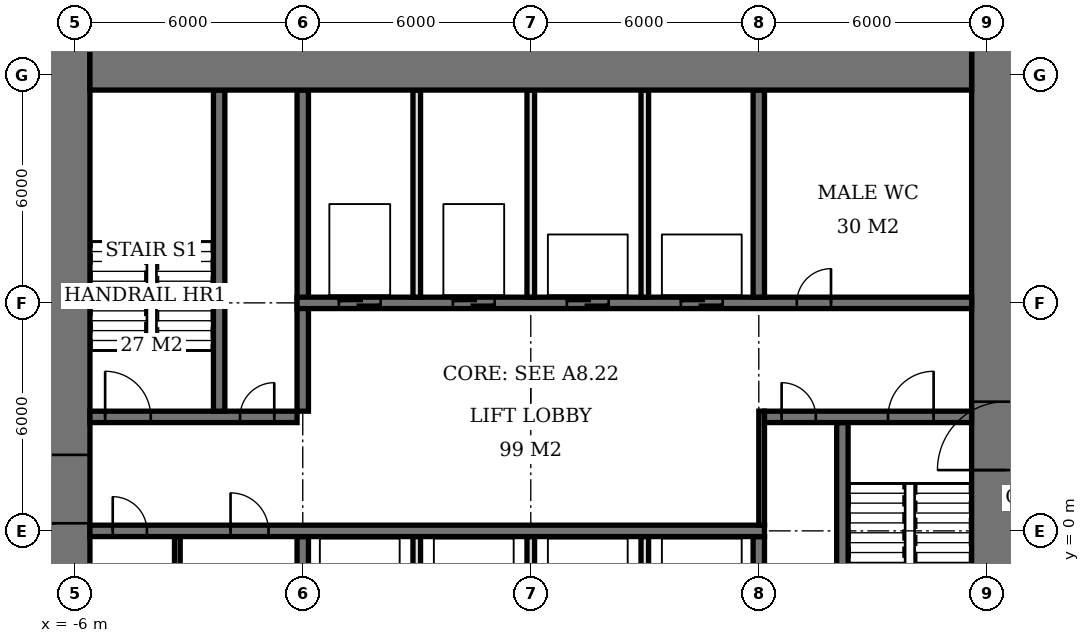
"""IFC4 building model, lengths in metres.
Left out: names, types, materials, properties, quantities, classifications, styles, units other than length and angle.
Written with IfcOpenShell. Run it as: python <this file> out.ifc"""

import sys

from ifc_helpers import new_model, si_unit, direction, frame, frame_2d, origin, place, context, subcontext, project, spatial, rectangle, extrude, element, fill, save


model = new_model("IFC4")
c1 = context("Model", 3, precision=1e-05, world=origin(), true_north=direction((0.0, 1.0)))
c2 = subcontext(c1, "Body", "Model", "MODEL_VIEW")
j1 = project(units=[si_unit("LENGTHUNIT", "METRE"), si_unit("PLANEANGLEUNIT", "RADIAN")], contexts=[c1])
p1 = place(None, origin())
s1 = spatial("IfcSite", under=j1, at=p1, CompositionType="ELEMENT")
p2 = place(p1, origin())
s2 = spatial("IfcBuilding", under=s1, at=p2, CompositionType="ELEMENT")
p3 = place(p2, frame((0.0, 0.0, 29.9)))
s3 = spatial("IfcBuildingStorey", under=s2, at=p3, CompositionType="ELEMENT", Elevation=29.9)
p4 = place(p3, frame((-5.6, 12.6, 0.0), z_axis=(0.0, 0.0, 1.0), x_axis=(1.0, 0.0, 0.0)))
e1 = element("IfcWall", 1, at=p4, inside=s3, PredefinedType="SHEAR", context=c2, shape_type="SweptSolid", body=[
    extrude(rectangle(XDim=23.2, YDim=2.0, at=frame_2d((11.6, 0.0))), origin(), (0.0, 0.0, 1.0), 3.9),
])
p5 = place(p3, frame((-6.5, -7.6, 0.0), z_axis=(0.0, 0.0, 1.0), x_axis=(0.0, 1.0, 0.0)))
e2 = element("IfcWall", 2, at=p5, inside=s3, PredefinedType="SHEAR", context=c2, shape_type="SweptSolid", body=[
    extrude(rectangle(XDim=21.2, YDim=1.8, at=frame_2d((10.6, 0.0))), origin(), (0.0, 0.0, 1.0), 3.9),
])
p6 = place(p5, frame((7.8, 0.0, 0.0)))
e3 = element("IfcOpeningElement", 3, at=p6, cuts=e2, PredefinedType="OPENING", context=c2, shape_type="SweptSolid", body=[
    extrude(rectangle(XDim=1.8, YDim=2.4, at=frame_2d((0.9, 1.2))), frame((0.0, 0.91, 0.0), z_axis=(0.0, -1.0, 0.0), x_axis=(1.0, 0.0, 0.0)), (0.0, 0.0, 1.0), 1.82),
])
p7 = place(p3, frame((18.5, -7.6, 0.0), z_axis=(0.0, 0.0, 1.0), x_axis=(0.0, 1.0, 0.0)))
e4 = element("IfcWall", 4, at=p7, inside=s3, PredefinedType="SHEAR", context=c2, shape_type="SweptSolid", body=[
    extrude(rectangle(XDim=21.2, YDim=1.8, at=frame_2d((10.6, 0.0))), origin(), (0.0, 0.0, 1.0), 3.9),
])
p8 = place(p7, frame((9.2, 0.0, 0.0)))
e5 = element("IfcOpeningElement", 5, at=p8, cuts=e4, PredefinedType="OPENING", context=c2, shape_type="SweptSolid", body=[
    extrude(rectangle(XDim=1.8, YDim=2.4, at=frame_2d((0.9, 1.2))), frame((0.0, 0.91, 0.0), z_axis=(0.0, -1.0, 0.0), x_axis=(1.0, 0.0, 0.0)), (0.0, 0.0, 1.0), 1.82),
])
p9 = place(p3, frame((-5.6, 0.0, 0.0), z_axis=(0.0, 0.0, 1.0), x_axis=(1.0, 0.0, 0.0)))
e6 = element("IfcWall", 6, at=p9, inside=s3, PredefinedType="SHEAR", context=c2, shape_type="SweptSolid", body=[
    extrude(rectangle(XDim=17.75, YDim=0.3, at=frame_2d((8.875, 0.0))), origin(), (0.0, 0.0, 1.0), 3.9),
])
p10 = place(p9, frame((0.6, 0.0, 0.0)))
e7 = element("IfcOpeningElement", 7, at=p10, cuts=e6, PredefinedType="OPENING", context=c2, shape_type="SweptSolid", body=[
    extrude(rectangle(XDim=0.9, YDim=2.1, at=frame_2d((0.45, 1.05))), frame((0.0, 0.16, 0.0), z_axis=(0.0, -1.0, 0.0), x_axis=(1.0, 0.0, 0.0)), (0.0, 0.0, 1.0), 0.32),
])
p11 = place(p9, frame((3.7, 0.0, 0.0)))
e8 = element("IfcOpeningElement", 8, at=p11, cuts=e6, PredefinedType="OPENING", context=c2, shape_type="SweptSolid", body=[
    extrude(rectangle(XDim=1.0, YDim=2.1, at=frame_2d((0.5, 1.05))), frame((0.0, 0.16, 0.0), z_axis=(0.0, -1.0, 0.0), x_axis=(1.0, 0.0, 0.0)), (0.0, 0.0, 1.0), 0.32),
])
p12 = place(p3, frame((-5.6, 3.0, 0.0), z_axis=(0.0, 0.0, 1.0), x_axis=(1.0, 0.0, 0.0)))
e9 = element("IfcWall", 9, at=p12, inside=s3, PredefinedType="SHEAR", context=c2, shape_type="SweptSolid", body=[
    extrude(rectangle(XDim=5.45, YDim=0.3, at=frame_2d((2.725, 0.0))), origin(), (0.0, 0.0, 1.0), 3.9),
])
p13 = place(p12, frame((0.4, 0.0, 0.0)))
e10 = element("IfcOpeningElement", 10, at=p13, cuts=e9, PredefinedType="OPENING", context=c2, shape_type="SweptSolid", body=[
    extrude(rectangle(XDim=1.2, YDim=2.1, at=frame_2d((0.6, 1.05))), frame((0.0, 0.16, 0.0), z_axis=(0.0, -1.0, 0.0), x_axis=(1.0, 0.0, 0.0)), (0.0, 0.0, 1.0), 0.32),
])
p14 = place(p12, frame((3.95, 0.0, 0.0)))
e11 = element("IfcOpeningElement", 11, at=p14, cuts=e9, PredefinedType="OPENING", context=c2, shape_type="SweptSolid", body=[
    extrude(rectangle(XDim=0.9, YDim=2.1, at=frame_2d((0.45, 1.05))), frame((0.0, 0.16, 0.0), z_axis=(0.0, -1.0, 0.0), x_axis=(1.0, 0.0, 0.0)), (0.0, 0.0, 1.0), 0.32),
])
p15 = place(p3, frame((12.15, 3.0, 0.0), z_axis=(0.0, 0.0, 1.0), x_axis=(1.0, 0.0, 0.0)))
e12 = element("IfcWall", 12, at=p15, inside=s3, PredefinedType="SHEAR", context=c2, shape_type="SweptSolid", body=[
    extrude(rectangle(XDim=5.45, YDim=0.3, at=frame_2d((2.725, 0.0))), origin(), (0.0, 0.0, 1.0), 3.9),
])
p16 = place(p15, frame((3.25, 0.0, 0.0)))
e13 = element("IfcOpeningElement", 13, at=p16, cuts=e12, PredefinedType="OPENING", context=c2, shape_type="SweptSolid", body=[
    extrude(rectangle(XDim=1.2, YDim=2.1, at=frame_2d((0.6, 1.05))), frame((0.0, 0.16, 0.0), z_axis=(0.0, -1.0, 0.0), x_axis=(1.0, 0.0, 0.0)), (0.0, 0.0, 1.0), 0.32),
])
p17 = place(p15, frame((0.45, 0.0, 0.0)))
e14 = element("IfcOpeningElement", 14, at=p17, cuts=e12, PredefinedType="OPENING", context=c2, shape_type="SweptSolid", body=[
    extrude(rectangle(XDim=0.9, YDim=2.1, at=frame_2d((0.45, 1.05))), frame((0.0, 0.16, 0.0), z_axis=(0.0, -1.0, 0.0), x_axis=(1.0, 0.0, 0.0)), (0.0, 0.0, 1.0), 0.32),
])
p18 = place(p3, frame((-0.15, 6.0, 0.0), z_axis=(0.0, 0.0, 1.0), x_axis=(1.0, 0.0, 0.0)))
e15 = element("IfcWall", 15, at=p18, inside=s3, PredefinedType="SHEAR", context=c2, shape_type="SweptSolid", body=[
    extrude(rectangle(XDim=17.75, YDim=0.3, at=frame_2d((8.875, 0.0))), origin(), (0.0, 0.0, 1.0), 3.9),
])
p19 = place(p18, frame((13.15, 0.0, 0.0)))
e16 = element("IfcOpeningElement", 16, at=p19, cuts=e15, PredefinedType="OPENING", context=c2, shape_type="SweptSolid", body=[
    extrude(rectangle(XDim=0.9, YDim=2.1, at=frame_2d((0.45, 1.05))), frame((0.0, 0.16, 0.0), z_axis=(0.0, -1.0, 0.0), x_axis=(1.0, 0.0, 0.0)), (0.0, 0.0, 1.0), 0.32),
])
p20 = place(p18, frame((1.1, 0.0, 0.0)))
e17 = element("IfcOpeningElement", 17, at=p20, cuts=e15, PredefinedType="OPENING", context=c2, shape_type="SweptSolid", body=[
    extrude(rectangle(XDim=1.1, YDim=2.1, at=frame_2d((0.55, 1.05))), frame((0.0, 0.16, 0.0), z_axis=(0.0, -1.0, 0.0), x_axis=(1.0, 0.0, 0.0)), (0.0, 0.0, 1.0), 0.32),
])
p21 = place(p18, frame((4.1, 0.0, 0.0)))
e18 = element("IfcOpeningElement", 18, at=p21, cuts=e15, PredefinedType="OPENING", context=c2, shape_type="SweptSolid", body=[
    extrude(rectangle(XDim=1.1, YDim=2.1, at=frame_2d((0.55, 1.05))), frame((0.0, 0.16, 0.0), z_axis=(0.0, -1.0, 0.0), x_axis=(1.0, 0.0, 0.0)), (0.0, 0.0, 1.0), 0.32),
])
p22 = place(p18, frame((7.1, 0.0, 0.0)))
e19 = element("IfcOpeningElement", 19, at=p22, cuts=e15, PredefinedType="OPENING", context=c2, shape_type="SweptSolid", body=[
    extrude(rectangle(XDim=1.1, YDim=2.1, at=frame_2d((0.55, 1.05))), frame((0.0, 0.16, 0.0), z_axis=(0.0, -1.0, 0.0), x_axis=(1.0, 0.0, 0.0)), (0.0, 0.0, 1.0), 0.32),
])
p23 = place(p18, frame((10.1, 0.0, 0.0)))
e20 = element("IfcOpeningElement", 20, at=p23, cuts=e15, PredefinedType="OPENING", context=c2, shape_type="SweptSolid", body=[
    extrude(rectangle(XDim=1.1, YDim=2.1, at=frame_2d((0.55, 1.05))), frame((0.0, 0.16, 0.0), z_axis=(0.0, -1.0, 0.0), x_axis=(1.0, 0.0, 0.0)), (0.0, 0.0, 1.0), 0.32),
])
p24 = place(p3, frame((0.0, -5.6, 0.0), z_axis=(0.0, 0.0, 1.0), x_axis=(0.0, 1.0, 0.0)))
e21 = element("IfcWall", 21, at=p24, inside=s3, PredefinedType="SHEAR", context=c2, shape_type="SweptSolid", body=[
    extrude(rectangle(XDim=5.45, YDim=0.3, at=frame_2d((2.725, 0.0))), origin(), (0.0, 0.0, 1.0), 3.9),
])
p25 = place(p3, frame((0.0, 3.15, 0.0), z_axis=(0.0, 0.0, 1.0), x_axis=(0.0, 1.0, 0.0)))
e22 = element("IfcWall", 22, at=p25, inside=s3, PredefinedType="SHEAR", context=c2, shape_type="SweptSolid", body=[
    extrude(rectangle(XDim=8.45, YDim=0.3, at=frame_2d((4.225, 0.0))), origin(), (0.0, 0.0, 1.0), 3.9),
])
for number, where, z_axis, x_axis in (
    (23, (12.0, -5.6, 0.0), (0.0, 0.0, 1.0), (0.0, 1.0, 0.0)),
    (24, (12.0, 6.15, 0.0), (0.0, 0.0, 1.0), (0.0, 1.0, 0.0)),
):
    element("IfcWall", number, at=place(p3, frame(where, z_axis=z_axis, x_axis=x_axis)), inside=s3, PredefinedType="SHEAR", context=c2, shape_type="SweptSolid", body=[
        extrude(rectangle(XDim=5.45, YDim=0.3, at=frame_2d((2.725, 0.0))), origin(), (0.0, 0.0, 1.0), 3.9),
    ])
for number, where, z_axis, x_axis in (
    (25, (-2.2, 3.15, 0.0), (0.0, 0.0, 1.0), (0.0, 1.0, 0.0)),
    (26, (14.2, -5.6, 0.0), (0.0, 0.0, 1.0), (0.0, 1.0, 0.0)),
):
    element("IfcWall", number, at=place(p3, frame(where, z_axis=z_axis, x_axis=x_axis)), inside=s3, PredefinedType="SHEAR", context=c2, shape_type="SweptSolid", body=[
        extrude(rectangle(XDim=8.45, YDim=0.3, at=frame_2d((4.225, 0.0))), origin(), (0.0, 0.0, 1.0), 3.9),
    ])
for number, where, z_axis, x_axis in (
    (27, (3.0, 6.15, 0.0), (0.0, 0.0, 1.0), (0.0, 1.0, 0.0)),
    (28, (6.0, 6.15, 0.0), (0.0, 0.0, 1.0), (0.0, 1.0, 0.0)),
    (29, (9.0, 6.15, 0.0), (0.0, 0.0, 1.0), (0.0, 1.0, 0.0)),
    (30, (3.0, -5.6, 0.0), (0.0, 0.0, 1.0), (0.0, 1.0, 0.0)),
    (31, (6.0, -5.6, 0.0), (0.0, 0.0, 1.0), (0.0, 1.0, 0.0)),
    (32, (9.0, -5.6, 0.0), (0.0, 0.0, 1.0), (0.0, 1.0, 0.0)),
):
    element("IfcWall", number, at=place(p3, frame(where, z_axis=z_axis, x_axis=x_axis)), inside=s3, PredefinedType="SOLIDWALL", context=c2, shape_type="SweptSolid", body=[
        extrude(rectangle(XDim=5.45, YDim=0.2, at=frame_2d((2.725, 0.0))), origin(), (0.0, 0.0, 1.0), 3.9),
    ])
p26 = place(p3, frame((-3.3, -5.6, 0.0), z_axis=(0.0, 0.0, 1.0), x_axis=(0.0, 1.0, 0.0)))
e33 = element("IfcWall", 33, at=p26, inside=s3, PredefinedType="PLUMBINGWALL", context=c2, shape_type="SweptSolid", body=[
    extrude(rectangle(XDim=5.45, YDim=0.15, at=frame_2d((2.725, 0.0))), origin(), (0.0, 0.0, 1.0), 3.65),
])
p27 = place(p3, frame((12.075, 0.15, 0.0), z_axis=(0.0, 0.0, 1.0), x_axis=(0.0, 1.0, 0.0)))
e34 = element("IfcWall", 34, at=p27, inside=s3, PredefinedType="PARTITIONING", context=c2, shape_type="SweptSolid", body=[
    extrude(rectangle(XDim=3.0, YDim=0.15, at=frame_2d((1.5, 0.0))), origin(), (0.0, 0.0, 1.0), 3.65),
])
p28 = place(p6, origin())
e35 = element("IfcDoor", 35, at=p28, inside=s3, OperationType="DOUBLE_DOOR_SINGLE_SWING", PredefinedType="DOOR", context=c2, shape_type="SweptSolid", body=[
    extrude(rectangle(XDim=1.8, YDim=2.4, at=frame_2d((0.9, 1.2))), frame((0.0, 0.025, 0.0), z_axis=(0.0, -1.0, 0.0), x_axis=(1.0, 0.0, 0.0)), (0.0, 0.0, 1.0), 0.05),
])
fill(e3, e35)
p29 = place(p8, origin())
e36 = element("IfcDoor", 36, at=p29, inside=s3, OperationType="DOUBLE_DOOR_SINGLE_SWING", PredefinedType="DOOR", context=c2, shape_type="SweptSolid", body=[
    extrude(rectangle(XDim=1.8, YDim=2.4, at=frame_2d((0.9, 1.2))), frame((0.0, 0.025, 0.0), z_axis=(0.0, -1.0, 0.0), x_axis=(1.0, 0.0, 0.0)), (0.0, 0.0, 1.0), 0.05),
])
fill(e5, e36)
p30 = place(p13, origin())
e37 = element("IfcDoor", 37, at=p30, inside=s3, OperationType="SINGLE_SWING_LEFT", PredefinedType="DOOR", context=c2, shape_type="SweptSolid", body=[
    extrude(rectangle(XDim=1.2, YDim=2.1, at=frame_2d((0.6, 1.05))), frame((0.0, 0.025, 0.0), z_axis=(0.0, -1.0, 0.0), x_axis=(1.0, 0.0, 0.0)), (0.0, 0.0, 1.0), 0.05),
])
fill(e10, e37)
p31 = place(p14, origin())
e38 = element("IfcDoor", 38, at=p31, inside=s3, OperationType="SINGLE_SWING_RIGHT", PredefinedType="DOOR", context=c2, shape_type="SweptSolid", body=[
    extrude(rectangle(XDim=0.9, YDim=2.1, at=frame_2d((0.45, 1.05))), frame((0.0, 0.025, 0.0), z_axis=(0.0, -1.0, 0.0), x_axis=(1.0, 0.0, 0.0)), (0.0, 0.0, 1.0), 0.05),
])
fill(e11, e38)
p32 = place(p16, origin())
e39 = element("IfcDoor", 39, at=p32, inside=s3, OperationType="SINGLE_SWING_RIGHT", PredefinedType="DOOR", context=c2, shape_type="SweptSolid", body=[
    extrude(rectangle(XDim=1.2, YDim=2.1, at=frame_2d((0.6, 1.05))), frame((0.0, 0.025, 0.0), z_axis=(0.0, -1.0, 0.0), x_axis=(1.0, 0.0, 0.0)), (0.0, 0.0, 1.0), 0.05),
])
fill(e13, e39)
p33 = place(p17, origin())
e40 = element("IfcDoor", 40, at=p33, inside=s3, OperationType="SINGLE_SWING_LEFT", PredefinedType="DOOR", context=c2, shape_type="SweptSolid", body=[
    extrude(rectangle(XDim=0.9, YDim=2.1, at=frame_2d((0.45, 1.05))), frame((0.0, 0.025, 0.0), z_axis=(0.0, -1.0, 0.0), x_axis=(1.0, 0.0, 0.0)), (0.0, 0.0, 1.0), 0.05),
])
fill(e14, e40)
p34 = place(p10, origin())
e41 = element("IfcDoor", 41, at=p34, inside=s3, OperationType="SINGLE_SWING_LEFT", PredefinedType="DOOR", context=c2, shape_type="SweptSolid", body=[
    extrude(rectangle(XDim=0.9, YDim=2.1, at=frame_2d((0.45, 1.05))), frame((0.0, 0.025, 0.0), z_axis=(0.0, -1.0, 0.0), x_axis=(1.0, 0.0, 0.0)), (0.0, 0.0, 1.0), 0.05),
])
fill(e7, e41)
p35 = place(p11, origin())
e42 = element("IfcDoor", 42, at=p35, inside=s3, OperationType="SINGLE_SWING_LEFT", PredefinedType="DOOR", context=c2, shape_type="SweptSolid", body=[
    extrude(rectangle(XDim=1.0, YDim=2.1, at=frame_2d((0.5, 1.05))), frame((0.0, 0.025, 0.0), z_axis=(0.0, -1.0, 0.0), x_axis=(1.0, 0.0, 0.0)), (0.0, 0.0, 1.0), 0.05),
])
fill(e8, e42)
p36 = place(p19, origin())
e43 = element("IfcDoor", 43, at=p36, inside=s3, OperationType="SINGLE_SWING_RIGHT", PredefinedType="DOOR", context=c2, shape_type="SweptSolid", body=[
    extrude(rectangle(XDim=0.9, YDim=2.1, at=frame_2d((0.45, 1.05))), frame((0.0, 0.025, 0.0), z_axis=(0.0, -1.0, 0.0), x_axis=(1.0, 0.0, 0.0)), (0.0, 0.0, 1.0), 0.05),
])
fill(e16, e43)
p37 = place(p20, origin())
e44 = element("IfcDoor", 44, at=p37, inside=s3, OperationType="DOUBLE_DOOR_SLIDING", PredefinedType="USERDEFINED", context=c2, shape_type="SweptSolid", body=[
    extrude(rectangle(XDim=1.1, YDim=2.1, at=frame_2d((0.55, 1.05))), frame((0.0, 0.025, 0.0), z_axis=(0.0, -1.0, 0.0), x_axis=(1.0, 0.0, 0.0)), (0.0, 0.0, 1.0), 0.05),
])
fill(e17, e44)
p38 = place(p21, origin())
e45 = element("IfcDoor", 45, at=p38, inside=s3, OperationType="DOUBLE_DOOR_SLIDING", PredefinedType="USERDEFINED", context=c2, shape_type="SweptSolid", body=[
    extrude(rectangle(XDim=1.1, YDim=2.1, at=frame_2d((0.55, 1.05))), frame((0.0, 0.025, 0.0), z_axis=(0.0, -1.0, 0.0), x_axis=(1.0, 0.0, 0.0)), (0.0, 0.0, 1.0), 0.05),
])
fill(e18, e45)
p39 = place(p22, origin())
e46 = element("IfcDoor", 46, at=p39, inside=s3, OperationType="DOUBLE_DOOR_SLIDING", PredefinedType="USERDEFINED", context=c2, shape_type="SweptSolid", body=[
    extrude(rectangle(XDim=1.1, YDim=2.1, at=frame_2d((0.55, 1.05))), frame((0.0, 0.025, 0.0), z_axis=(0.0, -1.0, 0.0), x_axis=(1.0, 0.0, 0.0)), (0.0, 0.0, 1.0), 0.05),
])
fill(e19, e46)
p40 = place(p23, origin())
e47 = element("IfcDoor", 47, at=p40, inside=s3, OperationType="DOUBLE_DOOR_SLIDING", PredefinedType="USERDEFINED", context=c2, shape_type="SweptSolid", body=[
    extrude(rectangle(XDim=1.1, YDim=2.1, at=frame_2d((0.55, 1.05))), frame((0.0, 0.025, 0.0), z_axis=(0.0, -1.0, 0.0), x_axis=(1.0, 0.0, 0.0)), (0.0, 0.0, 1.0), 0.05),
])
fill(e20, e47)
save(model, sys.argv[1])
